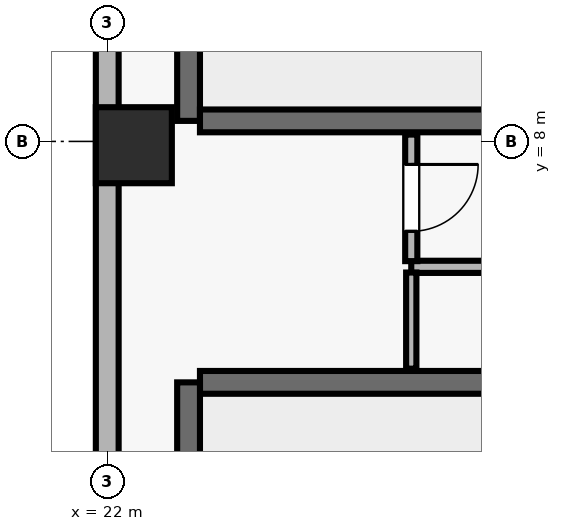
"""IFC4 building model, lengths in metres.
Left out: names, types, materials, properties, quantities, classifications, styles, units other than length and angle.
Written with IfcOpenShell. Run it as: python <this file> out.ifc"""

import sys

from ifc_helpers import new_model, si_unit, direction, frame, frame_2d, origin, origin_2d, place, context, subcontext, project, spatial, rectangle, extrude, element, fill, save


model = new_model("IFC4")
c1 = context("Model", 3, precision=1e-05, world=origin(), true_north=direction((0.0, 1.0)))
c2 = subcontext(c1, "Body", "Model", "MODEL_VIEW")
j1 = project(units=[si_unit("LENGTHUNIT", "METRE"), si_unit("PLANEANGLEUNIT", "RADIAN")], contexts=[c1])
p1 = place(None, origin())
s1 = spatial("IfcSite", under=j1, at=p1, CompositionType="ELEMENT")
p2 = place(p1, origin())
s2 = spatial("IfcBuilding", under=s1, at=p2, CompositionType="ELEMENT")
p3 = place(p2, frame((0.0, 0.0, 230.4)))
s3 = spatial("IfcBuildingStorey", under=s2, at=p3, CompositionType="ELEMENT", Elevation=230.4)
p4 = place(p3, frame((22.35, 7.95, 0.0), z_axis=(0.0, 0.0, 1.0), x_axis=(1.0, 0.0, 0.0)))
e1 = element("IfcColumn", 1, at=p4, inside=s3, PredefinedType="COLUMN", context=c2, shape_type="SweptSolid", body=[
    extrude(rectangle(XDim=1.0, YDim=1.0, at=origin_2d()), origin(), (0.0, 0.0, 1.0), 3.9),
])
p5 = place(p3, frame((22.0, 40.7, 0.0), z_axis=(0.0, 0.0, 1.0), x_axis=(0.0, -1.0, 0.0)))
e2 = element("IfcWall", 2, at=p5, inside=s3, PredefinedType="SOLIDWALL", context=c2, shape_type="SweptSolid", body=[
    extrude(rectangle(XDim=38.2, YDim=0.3, at=frame_2d((19.1, 0.0))), origin(), (0.0, 0.0, 1.0), 3.69),
])
p6 = place(p5, frame((6.7, 0.0, 0.0)))
e3 = element("IfcOpeningElement", 3, at=p6, cuts=e2, PredefinedType="OPENING", context=c2, shape_type="SweptSolid", body=[
    extrude(rectangle(XDim=1.0, YDim=2.2, at=frame_2d((0.5, 1.1))), frame((0.0, 0.16, 0.0), z_axis=(0.0, -1.0, 0.0), x_axis=(1.0, 0.0, 0.0)), (0.0, 0.0, 1.0), 0.32),
])
p7 = place(p5, frame((11.343, 0.0, 0.9)))
e4 = element("IfcOpeningElement", 4, at=p7, cuts=e2, PredefinedType="OPENING", context=c2, shape_type="SweptSolid", body=[
    extrude(rectangle(XDim=2.8, YDim=1.8, at=frame_2d((1.4, 0.9))), frame((0.0, 0.16, 0.0), z_axis=(0.0, -1.0, 0.0), x_axis=(1.0, 0.0, 0.0)), (0.0, 0.0, 1.0), 0.32),
])
p8 = place(p5, frame((18.15, 0.0, 0.9)))
e5 = element("IfcOpeningElement", 5, at=p8, cuts=e2, PredefinedType="OPENING", context=c2, shape_type="SweptSolid", body=[
    extrude(rectangle(XDim=2.8, YDim=1.8, at=frame_2d((1.4, 0.9))), frame((0.0, 0.16, 0.0), z_axis=(0.0, -1.0, 0.0), x_axis=(1.0, 0.0, 0.0)), (0.0, 0.0, 1.0), 0.32),
])
p9 = place(p5, frame((22.257, 0.0, 0.9)))
e6 = element("IfcOpeningElement", 6, at=p9, cuts=e2, PredefinedType="OPENING", context=c2, shape_type="SweptSolid", body=[
    extrude(rectangle(XDim=2.8, YDim=1.8, at=frame_2d((1.4, 0.9))), frame((0.0, 0.16, 0.0), z_axis=(0.0, -1.0, 0.0), x_axis=(1.0, 0.0, 0.0)), (0.0, 0.0, 1.0), 0.32),
])
p10 = place(p5, frame((28.614, 0.0, 0.9)))
e7 = element("IfcOpeningElement", 7, at=p10, cuts=e2, PredefinedType="OPENING", context=c2, shape_type="SweptSolid", body=[
    extrude(rectangle(XDim=2.8, YDim=1.8, at=frame_2d((1.4, 0.9))), frame((0.0, 0.16, 0.0), z_axis=(0.0, -1.0, 0.0), x_axis=(1.0, 0.0, 0.0)), (0.0, 0.0, 1.0), 0.32),
])
p11 = place(p3, frame((31.58, 4.83, 0.0), z_axis=(0.0, 0.0, 1.0), x_axis=(-1.0, 0.0, 0.0)))
e8 = element("IfcWall", 8, at=p11, inside=s3, PredefinedType="SHEAR", context=c2, shape_type="SweptSolid", body=[
    extrude(rectangle(XDim=8.36, YDim=0.3, at=frame_2d((4.18, 0.0))), origin(), (0.0, 0.0, 1.0), 3.69),
])
for number, where, z_axis, x_axis in (
    (9, (23.07, 4.83, 0.0), (0.0, 0.0, 1.0), (0.0, -1.0, 0.0)),
    (10, (23.07, 11.78, 0.0), (0.0, 0.0, 1.0), (0.0, -1.0, 0.0)),
):
    element("IfcWall", number, at=place(p3, frame(where, z_axis=z_axis, x_axis=x_axis)), inside=s3, PredefinedType="SHEAR", context=c2, shape_type="SweptSolid", body=[
        extrude(rectangle(XDim=3.51, YDim=0.3, at=frame_2d((1.755, 0.0))), origin(), (0.0, 0.0, 1.0), 3.69),
    ])
p12 = place(p3, frame((23.22, 8.27, 0.0), z_axis=(0.0, 0.0, 1.0), x_axis=(1.0, 0.0, 0.0)))
e11 = element("IfcWall", 11, at=p12, inside=s3, PredefinedType="SHEAR", context=c2, shape_type="SweptSolid", body=[
    extrude(rectangle(XDim=8.36, YDim=0.3, at=frame_2d((4.18, 0.0))), origin(), (0.0, 0.0, 1.0), 3.69),
])
p13 = place(p3, frame((26.0, 6.35, 0.0), z_axis=(0.0, 0.0, 1.0), x_axis=(1.0, 0.0, 0.0)))
e12 = element("IfcWall", 12, at=p13, inside=s3, PredefinedType="PARTITIONING", context=c2, shape_type="SweptSolid", body=[
    extrude(rectangle(XDim=2.85, YDim=0.16, at=frame_2d((1.425, 0.0))), origin(), (0.0, 0.0, 1.0), 3.69),
])
p14 = place(p13, frame((0.985, 0.0, 0.0)))
e13 = element("IfcOpeningElement", 13, at=p14, cuts=e12, PredefinedType="OPENING", context=c2, shape_type="SweptSolid", body=[
    extrude(rectangle(XDim=0.88, YDim=2.1, at=frame_2d((0.44, 1.05))), frame((0.0, 0.09, 0.0), z_axis=(0.0, -1.0, 0.0), x_axis=(1.0, 0.0, 0.0)), (0.0, 0.0, 1.0), 0.18),
])
p15 = place(p3, frame((26.0, 5.01, 0.0), z_axis=(0.0, 0.0, 1.0), x_axis=(0.0, 1.0, 0.0)))
e14 = element("IfcWall", 14, at=p15, inside=s3, PredefinedType="PARTITIONING", context=c2, shape_type="SweptSolid", body=[
    extrude(rectangle(XDim=1.265, YDim=0.135, at=frame_2d((0.632, 0.0))), origin(), (0.0, 0.0, 1.0), 3.69),
])
p16 = place(p3, frame((26.0, 8.09, 0.0), z_axis=(0.0, 0.0, 1.0), x_axis=(0.0, -1.0, 0.0)))
e15 = element("IfcWall", 15, at=p16, inside=s3, PredefinedType="PARTITIONING", context=c2, shape_type="SweptSolid", body=[
    extrude(rectangle(XDim=1.665, YDim=0.16, at=frame_2d((0.833, 0.0))), origin(), (0.0, 0.0, 1.0), 3.69),
])
p17 = place(p16, frame((0.393, 0.0, 0.0)))
e16 = element("IfcOpeningElement", 16, at=p17, cuts=e15, PredefinedType="OPENING", context=c2, shape_type="SweptSolid", body=[
    extrude(rectangle(XDim=0.88, YDim=2.1, at=frame_2d((0.44, 1.05))), frame((0.0, 0.09, 0.0), z_axis=(0.0, -1.0, 0.0), x_axis=(1.0, 0.0, 0.0)), (0.0, 0.0, 1.0), 0.18),
])
p18 = place(p17, origin())
e17 = element("IfcDoor", 17, at=p18, inside=s3, OperationType="SINGLE_SWING_LEFT", PredefinedType="DOOR", context=c2, shape_type="SweptSolid", body=[
    extrude(rectangle(XDim=0.88, YDim=2.1, at=frame_2d((0.44, 1.05))), frame((0.0, 0.025, 0.0), z_axis=(0.0, -1.0, 0.0), x_axis=(1.0, 0.0, 0.0)), (0.0, 0.0, 1.0), 0.05),
])
fill(e16, e17)
save(model, sys.argv[1])
